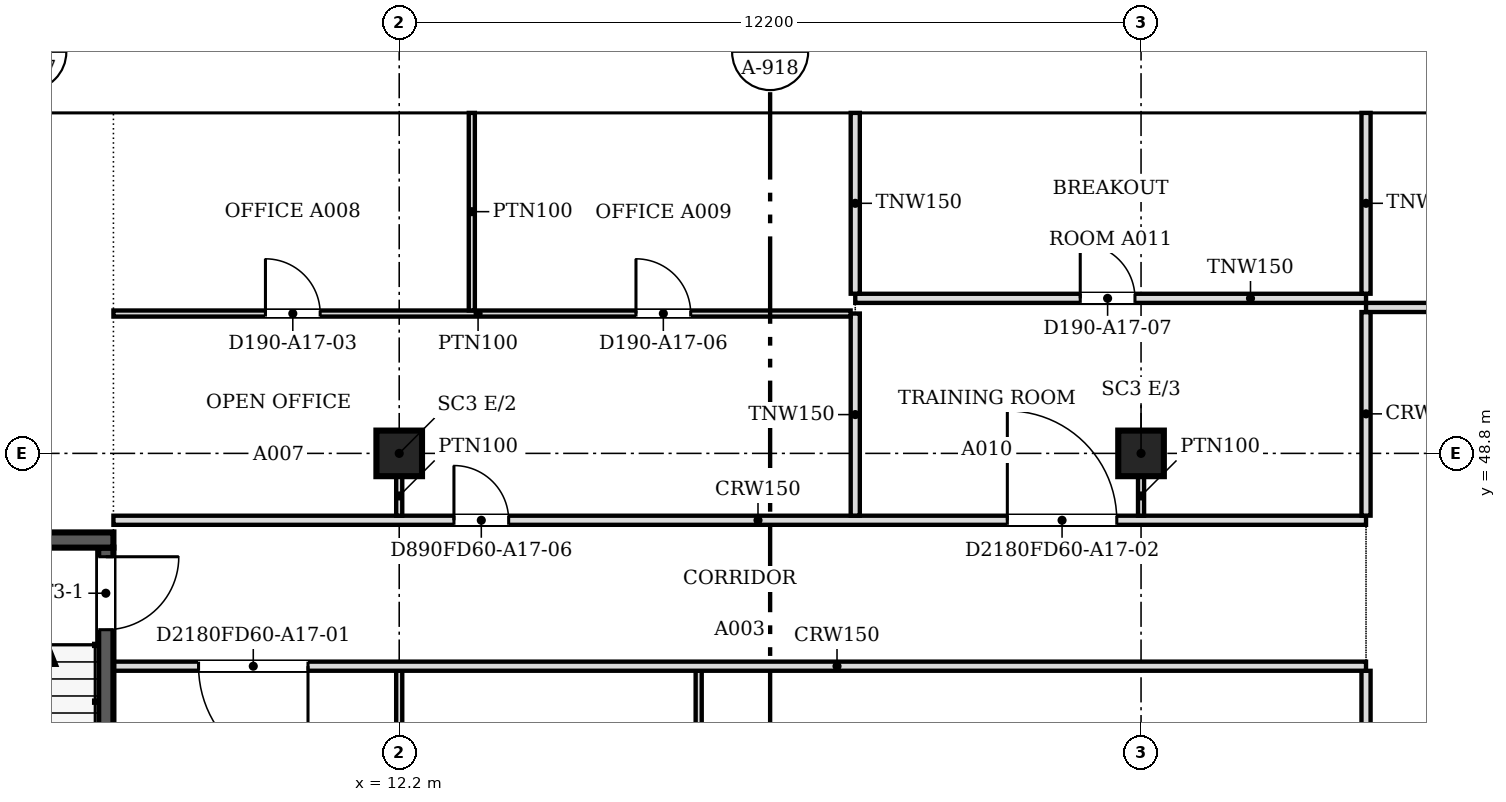
"""IFC4 building model, lengths in metres.
Left out: names, types, materials, properties, quantities, classifications, styles, units other than length and angle.
Written with IfcOpenShell. Run it as: python <this file> out.ifc"""

import sys

from ifc_helpers import new_model, si_unit, direction, frame, frame_2d, origin, origin_2d, place, context, subcontext, project, spatial, polyline, rectangle, outline, extrude, faceted_brep, source, transform, mapped, element, fill, save


model = new_model("IFC4")
c1 = context("Model", 3, precision=1e-05, world=origin(), true_north=direction((0.0, 1.0)))
c2 = subcontext(c1, "Body", "Model", "MODEL_VIEW")
j1 = project(units=[si_unit("LENGTHUNIT", "METRE"), si_unit("PLANEANGLEUNIT", "RADIAN")], contexts=[c1])
p1 = place(None, origin())
s1 = spatial("IfcSite", under=j1, at=p1, CompositionType="ELEMENT")
p2 = place(p1, origin())
s2 = spatial("IfcBuilding", under=s1, at=p2, CompositionType="ELEMENT")
p3 = place(p2, frame((0.0, 0.0, 189.6)))
s3 = spatial("IfcBuildingStorey", under=s2, at=p3, CompositionType="ELEMENT", Elevation=189.6)
for number, where, z_axis, x_axis in (
    (1, (12.2, 48.8, 0.0), (0.0, 0.0, 1.0), (1.0, 0.0, 0.0)),
    (2, (24.4, 48.8, 0.0), (0.0, 0.0, 1.0), (1.0, 0.0, 0.0)),
):
    element("IfcColumn", number, at=place(p3, frame(where, z_axis=z_axis, x_axis=x_axis)), inside=s3, PredefinedType="COLUMN", context=c2, shape_type="SweptSolid", body=[
        extrude(rectangle(XDim=0.75, YDim=0.75, at=origin_2d()), origin(), (0.0, 0.0, 1.0), 3.55),
    ])
m1 = source(origin(), c2, "Body", "SweptSolid", [
    extrude(outline(polyline([(3.05, 0.0), (6.1, 3.8), (3.05, 7.6), (0.0, 3.8), (3.05, 0.0)])), frame((0.0, 0.25, 0.0), z_axis=(0.0, -1.0, 0.0), x_axis=(1.0, 0.0, 0.0)), (0.0, 0.0, 1.0), 0.5),
])
p4 = place(p3, frame((30.5, 54.65, -3.8), z_axis=(0.0, 0.0, 1.0), x_axis=(-1.0, 0.0, 0.0)))
e3 = element("IfcWall", 3, at=p4, inside=s3, PredefinedType="SOLIDWALL", context=c2, shape_type="MappedRepresentation", body=[
    mapped(m1, transform((0.0, 0.0, 0.0), scale=1.0)),
])
m2 = source(origin(), c2, "Body", "SweptSolid", [
    extrude(outline(polyline([(3.05, 0.399), (5.78, 3.8), (3.05, 7.2), (0.321, 3.8), (3.05, 0.399)])), frame((0.0, 0.26, 0.0), z_axis=(0.0, -1.0, 0.0), x_axis=(1.0, 0.0, 0.0)), (0.0, 0.0, 1.0), 0.52),
])
p5 = place(p4, origin())
e4 = element("IfcOpeningElement", 4, at=p5, cuts=e3, PredefinedType="OPENING", context=c2, shape_type="MappedRepresentation", body=[
    mapped(m2, transform((0.0, 0.0, 0.0), scale=1.0)),
])
m3 = source(origin(), c2, "Body", "Brep", [
    faceted_brep([(3.05, -0.25, 0.0), (6.1, -0.25, 3.8), (6.1, -0.25, 3.8), (3.05, -0.25, 7.6), (0.0, -0.25, 3.8), (0.0, 0.25, 3.8), (3.05, 0.25, 7.6), (6.1, 0.25, 3.8), (6.1, 0.25, 3.8), (3.05, 0.25, 0.0)], [[[0, 1, 2, 3, 4]], [[5, 6, 7, 8, 9]], [[9, 8, 1, 0]], [[7, 6, 3, 2]], [[6, 5, 4, 3]], [[5, 9, 0, 4]], [[1, 8, 7, 2]]]),
])
p6 = place(p3, frame((24.4, 54.65, -3.8), z_axis=(0.0, 0.0, 1.0), x_axis=(-1.0, 0.0, 0.0)))
e5 = element("IfcWall", 5, at=p6, inside=s3, PredefinedType="SOLIDWALL", context=c2, shape_type="MappedRepresentation", body=[
    mapped(m3, transform((0.0, 0.0, 0.0), scale=1.0)),
])
p7 = place(p6, origin())
e6 = element("IfcOpeningElement", 6, at=p7, cuts=e5, PredefinedType="OPENING", context=c2, shape_type="MappedRepresentation", body=[
    mapped(m2, transform((0.0, 0.0, 0.0), scale=1.0)),
])
p8 = place(p3, frame((18.3, 54.65, -3.8), z_axis=(0.0, 0.0, 1.0), x_axis=(-1.0, 0.0, 0.0)))
e7 = element("IfcWall", 7, at=p8, inside=s3, PredefinedType="SOLIDWALL", context=c2, shape_type="MappedRepresentation", body=[
    mapped(m1, transform((0.0, 0.0, 0.0), scale=1.0)),
])
p9 = place(p8, origin())
e8 = element("IfcOpeningElement", 8, at=p9, cuts=e7, PredefinedType="OPENING", context=c2, shape_type="MappedRepresentation", body=[
    mapped(m2, transform((0.0, 0.0, 0.0), scale=1.0)),
])
m4 = source(origin(), c2, "Body", "Brep", [
    faceted_brep([(3.05, -0.25, 0.0), (6.053, -0.25, 3.8), (3.05, -0.25, 7.6), (0.0, -0.25, 3.8), (0.0, 0.25, 3.8), (3.05, 0.25, 7.6), (6.007, 0.25, 3.859), (6.007, 0.25, 3.741), (3.05, 0.25, 0.0), (6.053, 0.0, 3.8)], [[[0, 1, 2, 3]], [[4, 5, 6, 7, 8]], [[8, 7, 9, 1, 0]], [[6, 5, 2, 1, 9]], [[5, 4, 3, 2]], [[4, 8, 0, 3]], [[7, 6, 9]]]),
])
p10 = place(p3, frame((12.2, 54.65, -3.8), z_axis=(0.0, 0.0, 1.0), x_axis=(-1.0, 0.0, 0.0)))
e9 = element("IfcWall", 9, at=p10, inside=s3, PredefinedType="SOLIDWALL", context=c2, shape_type="MappedRepresentation", body=[
    mapped(m4, transform((0.0, 0.0, 0.0), scale=1.0)),
])
m5 = source(origin(), c2, "Body", "SweptSolid", [
    extrude(outline(polyline([(3.049, 0.401), (5.735, 3.8), (3.049, 7.199), (0.321, 3.8), (3.049, 0.401)])), frame((0.0, 0.26, 0.0), z_axis=(0.0, -1.0, 0.0), x_axis=(1.0, 0.0, 0.0)), (0.0, 0.0, 1.0), 0.52),
])
p11 = place(p10, origin())
e10 = element("IfcOpeningElement", 10, at=p11, cuts=e9, PredefinedType="OPENING", context=c2, shape_type="MappedRepresentation", body=[
    mapped(m5, transform((0.0, 0.0, 0.0), scale=1.0)),
])
m6 = source(origin(), c2, "Body", "SweptSolid", [
    extrude(outline(polyline([(3.05, 0.0), (6.1, 3.8), (0.0, 3.8), (3.05, 0.0)])), frame((0.0, 0.25, 0.0), z_axis=(0.0, -1.0, 0.0), x_axis=(1.0, 0.0, 0.0)), (0.0, 0.0, 1.0), 0.5),
])
p12 = place(p3, frame((33.55, 54.65, 0.0), z_axis=(0.0, 0.0, 1.0), x_axis=(-1.0, 0.0, 0.0)))
e11 = element("IfcWall", 11, at=p12, inside=s3, PredefinedType="SOLIDWALL", context=c2, shape_type="MappedRepresentation", body=[
    mapped(m6, transform((0.0, 0.0, 0.0), scale=1.0)),
])
m7 = source(origin(), c2, "Body", "SweptSolid", [
    extrude(outline(polyline([(3.05, 0.399), (5.579, 3.55), (0.521, 3.55), (3.05, 0.399)])), frame((0.0, 0.26, 0.0), z_axis=(0.0, -1.0, 0.0), x_axis=(1.0, 0.0, 0.0)), (0.0, 0.0, 1.0), 0.52),
])
p13 = place(p12, origin())
e12 = element("IfcOpeningElement", 12, at=p13, cuts=e11, PredefinedType="OPENING", context=c2, shape_type="MappedRepresentation", body=[
    mapped(m7, transform((0.0, 0.0, 0.0), scale=1.0)),
])
m8 = source(origin(), c2, "Body", "Brep", [
    faceted_brep([(3.05, -0.25, 0.0), (6.1, -0.25, 3.8), (6.1, -0.25, 3.8), (0.0, -0.25, 3.8), (0.0, 0.25, 3.8), (6.1, 0.25, 3.8), (6.1, 0.25, 3.8), (3.05, 0.25, 0.0)], [[[0, 1, 2, 3]], [[4, 5, 6, 7]], [[7, 6, 1, 0]], [[5, 4, 3, 2]], [[4, 7, 0, 3]], [[1, 6, 5, 2]]]),
])
p14 = place(p3, frame((27.45, 54.65, 0.0), z_axis=(0.0, 0.0, 1.0), x_axis=(-1.0, 0.0, 0.0)))
e13 = element("IfcWall", 13, at=p14, inside=s3, PredefinedType="SOLIDWALL", context=c2, shape_type="MappedRepresentation", body=[
    mapped(m8, transform((0.0, 0.0, 0.0), scale=1.0)),
])
p15 = place(p14, origin())
e14 = element("IfcOpeningElement", 14, at=p15, cuts=e13, PredefinedType="OPENING", context=c2, shape_type="MappedRepresentation", body=[
    mapped(m7, transform((0.0, 0.0, 0.0), scale=1.0)),
])
p16 = place(p3, frame((21.35, 54.65, 0.0), z_axis=(0.0, 0.0, 1.0), x_axis=(-1.0, 0.0, 0.0)))
e15 = element("IfcWall", 15, at=p16, inside=s3, PredefinedType="SOLIDWALL", context=c2, shape_type="MappedRepresentation", body=[
    mapped(m6, transform((0.0, 0.0, 0.0), scale=1.0)),
])
p17 = place(p16, origin())
e16 = element("IfcOpeningElement", 16, at=p17, cuts=e15, PredefinedType="OPENING", context=c2, shape_type="MappedRepresentation", body=[
    mapped(m7, transform((0.0, 0.0, 0.0), scale=1.0)),
])
p18 = place(p3, frame((15.25, 54.65, 0.0), z_axis=(0.0, 0.0, 1.0), x_axis=(-1.0, 0.0, 0.0)))
e17 = element("IfcWall", 17, at=p18, inside=s3, PredefinedType="SOLIDWALL", context=c2, shape_type="MappedRepresentation", body=[
    mapped(m6, transform((0.0, 0.0, 0.0), scale=1.0)),
])
p19 = place(p18, origin())
e18 = element("IfcOpeningElement", 18, at=p19, cuts=e17, PredefinedType="OPENING", context=c2, shape_type="MappedRepresentation", body=[
    mapped(m7, transform((0.0, 0.0, 0.0), scale=1.0)),
])
m9 = source(origin(), c2, "Body", "Brep", [
    faceted_brep([(3.003, -0.25, 0.0), (3.05, -0.25, 0.06), (3.05, -0.25, 3.8), (0.0, -0.25, 3.8), (0.0, 0.25, 3.8), (2.957, 0.25, 3.8), (2.957, 0.25, 0.059), (3.003, 0.0, 0.0)], [[[0, 1, 2, 3]], [[4, 5, 6]], [[1, 0, 7]], [[5, 4, 3, 2]], [[4, 6, 7, 0, 3]], [[1, 7, 6, 5, 2]]]),
])
p20 = place(p3, frame((9.15, 54.65, 0.0), z_axis=(0.0, 0.0, 1.0), x_axis=(-1.0, 0.0, 0.0)))
e19 = element("IfcWall", 19, at=p20, inside=s3, PredefinedType="SOLIDWALL", context=c2, shape_type="MappedRepresentation", body=[
    mapped(m9, transform((0.0, 0.0, 0.0), scale=1.0)),
])
m10 = source(origin(), c2, "Body", "SweptSolid", [
    extrude(outline(polyline([(2.803, 3.55), (0.516, 3.55), (2.803, 0.656), (2.803, 3.55)])), frame((0.0, 0.26, 0.0), z_axis=(0.0, -1.0, 0.0), x_axis=(1.0, 0.0, 0.0)), (0.0, 0.0, 1.0), 0.52),
])
p21 = place(p20, origin())
e20 = element("IfcOpeningElement", 20, at=p21, cuts=e19, PredefinedType="OPENING", context=c2, shape_type="MappedRepresentation", body=[
    mapped(m10, transform((0.0, 0.0, 0.0), scale=1.0)),
])
p22 = place(p3, frame((3.6, 47.375, 0.0), z_axis=(0.0, 0.0, 1.0), x_axis=(1.0, 0.0, 0.0)))
e21 = element("IfcWall", 21, at=p22, inside=s3, PredefinedType="SOLIDWALL", context=c2, shape_type="SweptSolid", body=[
    extrude(rectangle(XDim=3.9, YDim=0.25, at=frame_2d((1.95, 0.0))), origin(), (0.0, 0.0, 1.0), 3.8),
])
p23 = place(p3, frame((7.375, 47.25, 0.0), z_axis=(0.0, 0.0, 1.0), x_axis=(0.0, -1.0, 0.0)))
e22 = element("IfcWall", 22, at=p23, inside=s3, PredefinedType="SOLIDWALL", context=c2, shape_type="SweptSolid", body=[
    extrude(rectangle(XDim=8.0, YDim=0.25, at=frame_2d((4.0, 0.0))), origin(), (0.0, 0.0, 1.0), 3.8),
])
m11 = source(origin(), c2, "Body", "SweptSolid", [
    extrude(rectangle(XDim=1.2, YDim=2.1, at=frame_2d((0.6, 1.05))), frame((0.0, 0.135, 0.0), z_axis=(0.0, -1.0, 0.0), x_axis=(1.0, 0.0, 0.0)), (0.0, 0.0, 1.0), 0.27),
])
p24 = place(p23, frame((0.15, 0.0, 0.0)))
e23 = element("IfcOpeningElement", 23, at=p24, cuts=e22, PredefinedType="OPENING", context=c2, shape_type="MappedRepresentation", body=[
    mapped(m11, transform((0.0, 0.0, 0.0), scale=1.0)),
])
p25 = place(p3, frame((28.1, 18.8, 0.0), z_axis=(0.0, 0.0, 1.0), x_axis=(0.0, 1.0, 0.0)))
e24 = element("IfcWall", 24, at=p25, inside=s3, PredefinedType="PARTITIONING", context=c2, shape_type="SweptSolid", body=[
    extrude(rectangle(XDim=26.424, YDim=0.15, at=frame_2d((13.212, 0.0))), origin(), (0.0, 0.0, 1.0), 2.947),
])
m12 = source(origin(), c2, "Body", "SweptSolid", [
    extrude(rectangle(XDim=0.9, YDim=2.1, at=frame_2d((0.45, 1.05))), frame((0.0, 0.085, 0.0), z_axis=(0.0, -1.0, 0.0), x_axis=(1.0, 0.0, 0.0)), (0.0, 0.0, 1.0), 0.17),
])
p26 = place(p25, frame((1.1, 0.0, 0.0)))
e25 = element("IfcOpeningElement", 25, at=p26, cuts=e24, PredefinedType="OPENING", context=c2, shape_type="MappedRepresentation", body=[
    mapped(m12, transform((0.0, 0.0, 0.0), scale=1.0)),
])
p27 = place(p25, frame((14.301, 0.0, 0.0)))
e26 = element("IfcOpeningElement", 26, at=p27, cuts=e24, PredefinedType="OPENING", context=c2, shape_type="MappedRepresentation", body=[
    mapped(m12, transform((0.0, 0.0, 0.0), scale=1.0)),
])
p28 = place(p25, frame((8.2, 0.0, 0.0)))
e27 = element("IfcOpeningElement", 27, at=p28, cuts=e24, PredefinedType="OPENING", context=c2, shape_type="MappedRepresentation", body=[
    mapped(m12, transform((0.0, 0.0, 0.0), scale=1.0)),
])
m13 = source(origin(), c2, "Body", "SweptSolid", [
    extrude(rectangle(XDim=1.0, YDim=2.1, at=frame_2d((0.5, 1.05))), frame((0.0, 0.085, 0.0), z_axis=(0.0, -1.0, 0.0), x_axis=(1.0, 0.0, 0.0)), (0.0, 0.0, 1.0), 0.17),
])
p29 = place(p25, frame((21.6, 0.0, 0.0)))
e28 = element("IfcOpeningElement", 28, at=p29, cuts=e24, PredefinedType="OPENING", context=c2, shape_type="MappedRepresentation", body=[
    mapped(m13, transform((0.0, 0.0, 0.0), scale=1.0)),
])
p30 = place(p3, frame((17.125, 36.676, 0.0), z_axis=(0.0, 0.0, 1.0), x_axis=(0.0, 1.0, 0.0)))
e29 = element("IfcWall", 29, at=p30, inside=s3, PredefinedType="PARTITIONING", context=c2, shape_type="SweptSolid", body=[
    extrude(rectangle(XDim=8.548, YDim=0.1, at=frame_2d((4.274, 0.0))), origin(), (0.0, 0.0, 1.0), 2.947),
])
m14 = source(origin(), c2, "Body", "SweptSolid", [
    extrude(rectangle(XDim=0.9, YDim=2.1, at=frame_2d((0.45, 1.05))), frame((0.0, 0.06, 0.0), z_axis=(0.0, -1.0, 0.0), x_axis=(1.0, 0.0, 0.0)), (0.0, 0.0, 1.0), 0.12),
])
p31 = place(p30, frame((3.8, 0.0, 0.0)))
e30 = element("IfcOpeningElement", 30, at=p31, cuts=e29, PredefinedType="OPENING", context=c2, shape_type="MappedRepresentation", body=[
    mapped(m14, transform((0.0, 0.0, 0.0), scale=1.0)),
])
p32 = place(p3, frame((12.2, 42.026, 0.0), z_axis=(0.0, 0.0, 1.0), x_axis=(0.0, 1.0, 0.0)))
e31 = element("IfcWall", 31, at=p32, inside=s3, PredefinedType="PARTITIONING", context=c2, shape_type="SweptSolid", body=[
    extrude(rectangle(XDim=3.198, YDim=0.1, at=frame_2d((1.599, 0.0))), origin(), (0.0, 0.0, 1.0), 2.947),
])
p33 = place(p3, frame((28.1, 45.3, 0.0), z_axis=(0.0, 0.0, 1.0), x_axis=(-1.0, 0.0, 0.0)))
e32 = element("IfcWall", 32, at=p33, inside=s3, PredefinedType="PARTITIONING", context=c2, shape_type="SweptSolid", body=[
    extrude(rectangle(XDim=20.6, YDim=0.15, at=frame_2d((10.3, 0.0))), origin(), (0.0, 0.0, 1.0), 2.947),
])
m15 = source(origin(), c2, "Body", "SweptSolid", [
    extrude(rectangle(XDim=1.8, YDim=2.1, at=frame_2d((0.9, 1.05))), frame((0.0, 0.085, 0.0), z_axis=(0.0, -1.0, 0.0), x_axis=(1.0, 0.0, 0.0)), (0.0, 0.0, 1.0), 0.17),
])
p34 = place(p33, frame((17.4, 0.0, 0.0)))
e33 = element("IfcOpeningElement", 33, at=p34, cuts=e32, PredefinedType="OPENING", context=c2, shape_type="MappedRepresentation", body=[
    mapped(m15, transform((0.0, 0.0, 0.0), scale=1.0)),
])
p35 = place(p3, frame((7.5, 47.7, 0.0), z_axis=(0.0, 0.0, 1.0), x_axis=(1.0, 0.0, 0.0)))
e34 = element("IfcWall", 34, at=p35, inside=s3, PredefinedType="PARTITIONING", context=c2, shape_type="SweptSolid", body=[
    extrude(rectangle(XDim=20.6, YDim=0.15, at=frame_2d((10.3, 0.0))), origin(), (0.0, 0.0, 1.0), 2.947),
])
p36 = place(p35, frame((14.701, 0.0, 0.0)))
e35 = element("IfcOpeningElement", 35, at=p36, cuts=e34, PredefinedType="OPENING", context=c2, shape_type="MappedRepresentation", body=[
    mapped(m15, transform((0.0, 0.0, 0.0), scale=1.0)),
])
p37 = place(p35, frame((5.6, 0.0, 0.0)))
e36 = element("IfcOpeningElement", 36, at=p37, cuts=e34, PredefinedType="OPENING", context=c2, shape_type="MappedRepresentation", body=[
    mapped(m12, transform((0.0, 0.0, 0.0), scale=1.0)),
])
p38 = place(p3, frame((19.7, 47.776, 0.0), z_axis=(0.0, 0.0, 1.0), x_axis=(0.0, 1.0, 0.0)))
e37 = element("IfcWall", 37, at=p38, inside=s3, PredefinedType="PARTITIONING", context=c2, shape_type="SweptSolid", body=[
    extrude(rectangle(XDim=3.324, YDim=0.15, at=frame_2d((1.662, 0.0))), origin(), (0.0, 0.0, 1.0), 2.947),
])
p39 = place(p3, frame((28.1, 47.776, 0.0), z_axis=(0.0, 0.0, 1.0), x_axis=(0.0, 1.0, 0.0)))
e38 = element("IfcWall", 38, at=p39, inside=s3, PredefinedType="PARTITIONING", context=c2, shape_type="SweptSolid", body=[
    extrude(rectangle(XDim=3.348, YDim=0.15, at=frame_2d((1.674, 0.0))), origin(), (0.0, 0.0, 1.0), 2.947),
])
for number, where, z_axis, x_axis in (
    (39, (12.2, 48.425, 0.0), (0.0, 0.0, 1.0), (0.0, -1.0, 0.0)),
    (40, (24.4, 48.425, 0.0), (0.0, 0.0, 1.0), (0.0, -1.0, 0.0)),
):
    element("IfcWall", number, at=place(p3, frame(where, z_axis=z_axis, x_axis=x_axis)), inside=s3, PredefinedType="PARTITIONING", context=c2, shape_type="SweptSolid", body=[
        extrude(rectangle(XDim=0.65, YDim=0.1, at=frame_2d((0.325, 0.0))), origin(), (0.0, 0.0, 1.0), 2.947),
    ])
p40 = place(p3, frame((7.5, 51.1, 0.0), z_axis=(0.0, 0.0, 1.0), x_axis=(1.0, 0.0, 0.0)))
e41 = element("IfcWall", 41, at=p40, inside=s3, PredefinedType="PARTITIONING", context=c2, shape_type="SweptSolid", body=[
    extrude(rectangle(XDim=12.124, YDim=0.1, at=frame_2d((6.062, 0.0))), origin(), (0.0, 0.0, 1.0), 2.947),
])
p41 = place(p40, frame((2.5, 0.0, 0.0)))
e42 = element("IfcOpeningElement", 42, at=p41, cuts=e41, PredefinedType="OPENING", context=c2, shape_type="MappedRepresentation", body=[
    mapped(m14, transform((0.0, 0.0, 0.0), scale=1.0)),
])
p42 = place(p40, frame((8.594, 0.0, 0.0)))
e43 = element("IfcOpeningElement", 43, at=p42, cuts=e41, PredefinedType="OPENING", context=c2, shape_type="MappedRepresentation", body=[
    mapped(m14, transform((0.0, 0.0, 0.0), scale=1.0)),
])
p43 = place(p3, frame((13.394, 51.151, 0.0), z_axis=(0.0, 0.0, 1.0), x_axis=(0.0, 1.0, 0.0)))
e44 = element("IfcWall", 44, at=p43, inside=s3, PredefinedType="PARTITIONING", context=c2, shape_type="SweptSolid", body=[
    extrude(rectangle(XDim=3.249, YDim=0.1, at=frame_2d((1.625, 0.0))), origin(), (0.0, 0.0, 1.0), 2.947),
])
p44 = place(p3, frame((28.1, 51.2, 0.0), z_axis=(0.0, 0.0, 1.0), x_axis=(1.0, 0.0, 0.0)))
e45 = element("IfcWall", 45, at=p44, inside=s3, PredefinedType="PARTITIONING", context=c2, shape_type="SweptSolid", body=[
    extrude(rectangle(XDim=31.438, YDim=0.15, at=frame_2d((15.719, 0.0))), origin(), (0.0, 0.0, 1.0), 2.947),
])
p45 = place(p44, frame((7.0, 0.0, 0.0)))
e46 = element("IfcOpeningElement", 46, at=p45, cuts=e45, PredefinedType="OPENING", context=c2, shape_type="MappedRepresentation", body=[
    mapped(m12, transform((0.0, 0.0, 0.0), scale=1.0)),
])
p46 = place(p44, frame((22.8, 0.0, 0.0)))
e47 = element("IfcOpeningElement", 47, at=p46, cuts=e45, PredefinedType="OPENING", context=c2, shape_type="MappedRepresentation", body=[
    mapped(m12, transform((0.0, 0.0, 0.0), scale=1.0)),
])
p47 = place(p3, frame((19.7, 51.35, 0.0), z_axis=(0.0, 0.0, 1.0), x_axis=(1.0, 0.0, 0.0)))
e48 = element("IfcWall", 48, at=p47, inside=s3, PredefinedType="PARTITIONING", context=c2, shape_type="SweptSolid", body=[
    extrude(rectangle(XDim=8.4, YDim=0.15, at=frame_2d((4.2, 0.0))), origin(), (0.0, 0.0, 1.0), 2.947),
])
p48 = place(p47, frame((3.7, 0.0, 0.0)))
e49 = element("IfcOpeningElement", 49, at=p48, cuts=e48, PredefinedType="OPENING", context=c2, shape_type="MappedRepresentation", body=[
    mapped(m12, transform((0.0, 0.0, 0.0), scale=1.0)),
])
for number, where, z_axis, x_axis in (
    (50, (19.7, 51.426, 0.0), (0.0, 0.0, 1.0), (0.0, 1.0, 0.0)),
    (51, (28.1, 51.426, 0.0), (0.0, 0.0, 1.0), (0.0, 1.0, 0.0)),
):
    element("IfcWall", number, at=place(p3, frame(where, z_axis=z_axis, x_axis=x_axis)), inside=s3, PredefinedType="PARTITIONING", context=c2, shape_type="SweptSolid", body=[
        extrude(rectangle(XDim=2.974, YDim=0.15, at=frame_2d((1.487, 0.0))), origin(), (0.0, 0.0, 1.0), 2.947),
    ])
m16 = source(origin(), c2, "Body", "SweptSolid", [
    extrude(rectangle(XDim=1.2, YDim=2.1, at=frame_2d((0.6, 1.05))), frame((0.0, 0.025, 0.0), z_axis=(0.0, -1.0, 0.0), x_axis=(1.0, 0.0, 0.0)), (0.0, 0.0, 1.0), 0.05),
])
p49 = place(p24, origin())
e52 = element("IfcDoor", 52, at=p49, inside=s3, OperationType="SINGLE_SWING_LEFT", PredefinedType="DOOR", context=c2, shape_type="MappedRepresentation", body=[
    mapped(m16, transform((0.0, 0.0, 0.0), scale=1.0)),
])
fill(e23, e52)
m17 = source(origin(), c2, "Body", "SweptSolid", [
    extrude(rectangle(XDim=1.8, YDim=2.1, at=frame_2d((0.9, 1.05))), frame((0.0, 0.025, 0.0), z_axis=(0.0, -1.0, 0.0), x_axis=(1.0, 0.0, 0.0)), (0.0, 0.0, 1.0), 0.05),
])
p50 = place(p34, origin())
e53 = element("IfcDoor", 53, at=p50, inside=s3, OperationType="DOUBLE_DOOR_SINGLE_SWING", PredefinedType="DOOR", context=c2, shape_type="MappedRepresentation", body=[
    mapped(m17, transform((0.0, 0.0, 0.0), scale=1.0)),
])
fill(e33, e53)
m18 = source(origin(), c2, "Body", "SweptSolid", [
    extrude(rectangle(XDim=0.9, YDim=2.1, at=frame_2d((0.45, 1.05))), frame((0.0, 0.025, 0.0), z_axis=(0.0, -1.0, 0.0), x_axis=(1.0, 0.0, 0.0)), (0.0, 0.0, 1.0), 0.05),
])
p51 = place(p41, origin())
e54 = element("IfcDoor", 54, at=p51, inside=s3, OperationType="SINGLE_SWING_LEFT", PredefinedType="DOOR", context=c2, shape_type="MappedRepresentation", body=[
    mapped(m18, transform((0.0, 0.0, 0.0), scale=1.0)),
])
fill(e42, e54)
p52 = place(p42, origin())
e55 = element("IfcDoor", 55, at=p52, inside=s3, OperationType="SINGLE_SWING_LEFT", PredefinedType="DOOR", context=c2, shape_type="MappedRepresentation", body=[
    mapped(m18, transform((0.0, 0.0, 0.0), scale=1.0)),
])
fill(e43, e55)
p53 = place(p36, origin())
e56 = element("IfcDoor", 56, at=p53, inside=s3, OperationType="DOUBLE_DOOR_SINGLE_SWING", PredefinedType="DOOR", context=c2, shape_type="MappedRepresentation", body=[
    mapped(m17, transform((0.0, 0.0, 0.0), scale=1.0)),
])
fill(e35, e56)
p54 = place(p48, origin())
e57 = element("IfcDoor", 57, at=p54, inside=s3, OperationType="SINGLE_SWING_LEFT", PredefinedType="DOOR", context=c2, shape_type="MappedRepresentation", body=[
    mapped(m18, transform((0.0, 0.0, 0.0), scale=1.0)),
])
fill(e49, e57)
p55 = place(p37, origin())
e58 = element("IfcDoor", 58, at=p55, inside=s3, OperationType="SINGLE_SWING_LEFT", PredefinedType="DOOR", context=c2, shape_type="MappedRepresentation", body=[
    mapped(m18, transform((0.0, 0.0, 0.0), scale=1.0)),
])
fill(e36, e58)
save(model, sys.argv[1])
